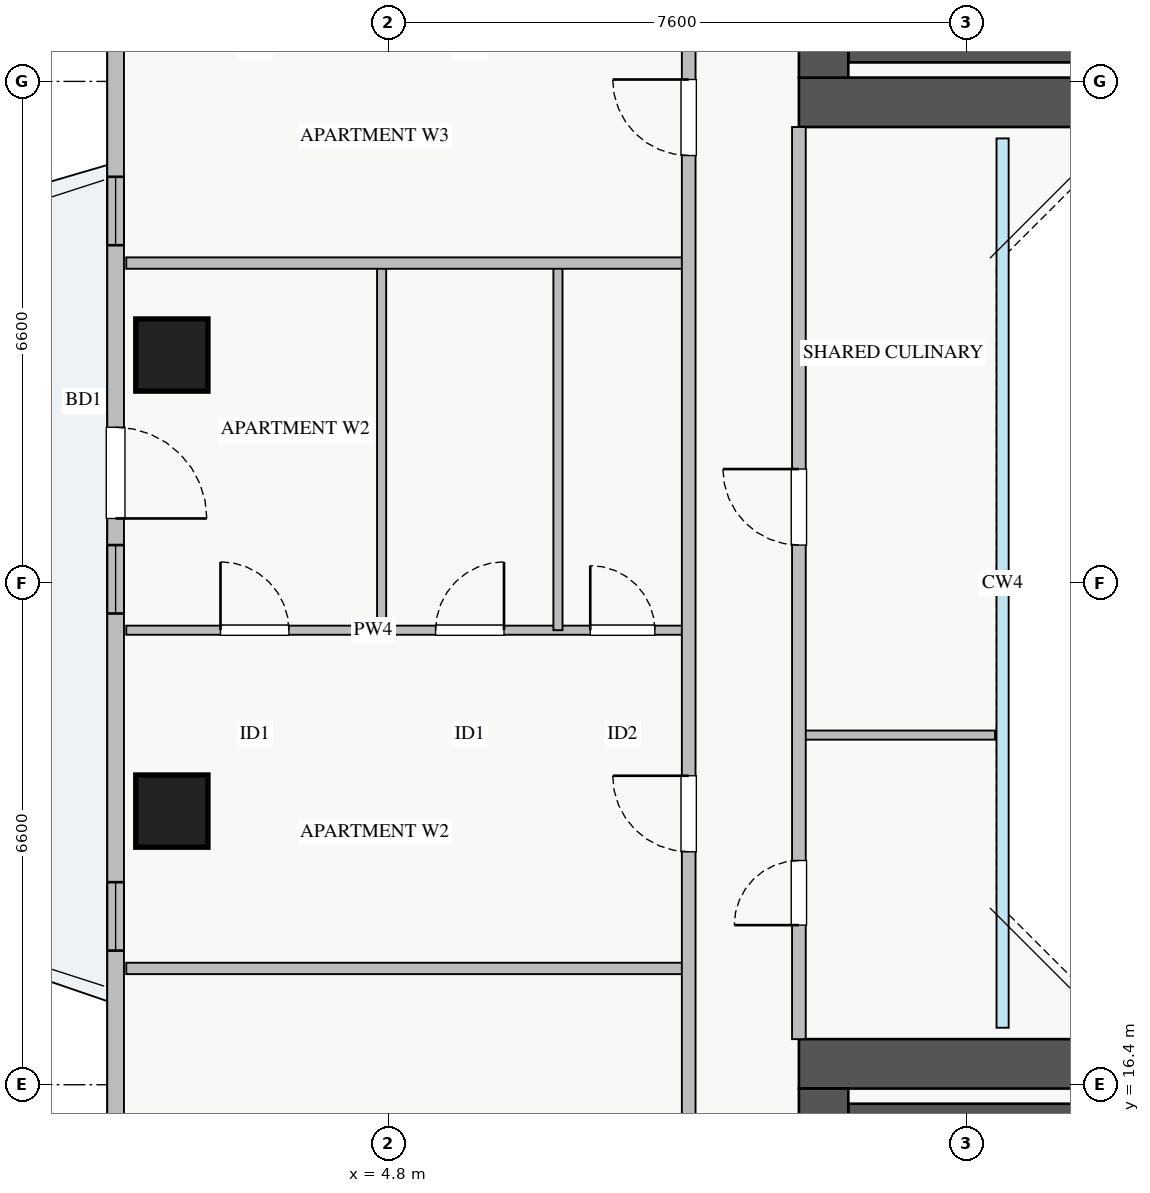
"""IFC4 building model, lengths in metres.
Left out: names, types, materials, properties, quantities, classifications, styles, units other than length and angle.
Written with IfcOpenShell. Run it as: python <this file> out.ifc"""

import sys

from ifc_helpers import new_model, si_unit, direction, frame, frame_2d, origin, origin_2d, place, context, subcontext, project, spatial, rectangle, extrude, source, transform, mapped, element, fill, save


model = new_model("IFC4")
c1 = context("Model", 3, precision=1e-05, world=origin(), true_north=direction((0.0, 1.0)))
c2 = subcontext(c1, "Body", "Model", "MODEL_VIEW")
j1 = project(units=[si_unit("LENGTHUNIT", "METRE"), si_unit("PLANEANGLEUNIT", "RADIAN")], contexts=[c1])
p1 = place(None, origin())
s1 = spatial("IfcSite", under=j1, at=p1, CompositionType="ELEMENT")
p2 = place(p1, origin())
s2 = spatial("IfcBuilding", under=s1, at=p2, CompositionType="ELEMENT")
p3 = place(p2, frame((0.0, 0.0, 147.0)))
s3 = spatial("IfcBuildingStorey", under=s2, at=p3, CompositionType="ELEMENT", Elevation=147.0)
for number, where, z_axis, x_axis in (
    (1, (10.85, 29.95, 0.0), (0.0, 0.0, 1.0), (1.0, 0.0, 0.0)),
    (2, (10.85, 16.05, 0.0), (0.0, 0.0, 1.0), (1.0, 0.0, 0.0)),
):
    element("IfcWall", number, at=place(p3, frame(where, z_axis=z_axis, x_axis=x_axis)), inside=s3, PredefinedType="SHEAR", context=c2, shape_type="SweptSolid", body=[
        extrude(rectangle(XDim=7.3, YDim=0.2, at=frame_2d((3.65, 0.0))), origin(), (0.0, 0.0, 1.0), 3.25),
    ])
p4 = place(p3, frame((10.2, 29.325, 0.0), z_axis=(0.0, 0.0, 1.0), x_axis=(1.0, 0.0, 0.0)))
e3 = element("IfcWall", 3, at=p4, inside=s3, PredefinedType="SHEAR", context=c2, shape_type="SweptSolid", body=[
    extrude(rectangle(XDim=17.6, YDim=0.65, at=frame_2d((8.8, 0.0))), origin(), (0.0, 0.0, 1.0), 3.25),
])
p5 = place(p3, frame((10.525, 29.65, 0.0), z_axis=(0.0, 0.0, 1.0), x_axis=(0.0, 1.0, 0.0)))
e4 = element("IfcWall", 4, at=p5, inside=s3, PredefinedType="SHEAR", context=c2, shape_type="SweptSolid", body=[
    extrude(rectangle(XDim=5.9, YDim=0.65, at=frame_2d((2.95, 0.0))), origin(), (0.0, 0.0, 1.0), 3.25),
])
p6 = place(p3, frame((10.2, 16.675, 0.0), z_axis=(0.0, 0.0, 1.0), x_axis=(1.0, 0.0, 0.0)))
e5 = element("IfcWall", 5, at=p6, inside=s3, PredefinedType="SHEAR", context=c2, shape_type="SweptSolid", body=[
    extrude(rectangle(XDim=17.6, YDim=0.65, at=frame_2d((8.8, 0.0))), origin(), (0.0, 0.0, 1.0), 3.25),
])
p7 = place(p3, frame((10.525, 10.45, 0.0), z_axis=(0.0, 0.0, 1.0), x_axis=(0.0, 1.0, 0.0)))
e6 = element("IfcWall", 6, at=p7, inside=s3, PredefinedType="SHEAR", context=c2, shape_type="SweptSolid", body=[
    extrude(rectangle(XDim=5.9, YDim=0.65, at=frame_2d((2.95, 0.0))), origin(), (0.0, 0.0, 1.0), 3.25),
])
m1 = source(origin(), c2, "Body", "SweptSolid", [
    extrude(rectangle(XDim=0.95, YDim=0.95, at=origin_2d()), origin(), (0.0, 0.0, 1.0), 3.25),
])
for number, where, z_axis, x_axis in (
    (7, (1.95, 26.0, 0.0), (0.0, 0.0, 1.0), (1.0, 0.0, 0.0)),
    (8, (1.95, 20.0, 0.0), (0.0, 0.0, 1.0), (1.0, 0.0, 0.0)),
):
    element("IfcColumn", number, at=place(p3, frame(where, z_axis=z_axis, x_axis=x_axis)), inside=s3, PredefinedType="COLUMN", context=c2, shape_type="MappedRepresentation", body=[
        mapped(m1, transform((0.0, 0.0, 0.0), x_axis=(1.0, 0.0, 0.0), y_axis=(0.0, 1.0, 0.0), z_axis=(0.0, 0.0, 1.0), scale=1.0)),
    ])
p8 = place(p3, frame((1.21, 10.55, 0.0), z_axis=(0.0, 0.0, 1.0), x_axis=(0.0, 1.0, 0.0)))
e9 = element("IfcWall", 9, at=p8, inside=s3, PredefinedType="STANDARD", context=c2, shape_type="SweptSolid", body=[
    extrude(rectangle(XDim=24.9, YDim=0.22, at=frame_2d((12.45, 0.0))), origin(), (0.0, 0.0, 1.0), 2.61),
])
p9 = place(p8, frame((13.3, 0.0, 0.0)))
e10 = element("IfcOpeningElement", 10, at=p9, cuts=e9, PredefinedType="OPENING", context=c2, shape_type="SweptSolid", body=[
    extrude(rectangle(XDim=1.2, YDim=2.1, at=frame_2d((0.6, 1.05))), frame((0.0, 0.12, 0.0), z_axis=(0.0, -1.0, 0.0), x_axis=(1.0, 0.0, 0.0)), (0.0, 0.0, 1.0), 0.24),
])
p10 = place(p8, frame((1.912, 0.0, 0.9)))
e11 = element("IfcOpeningElement", 11, at=p10, cuts=e9, PredefinedType="OPENING", context=c2, shape_type="SweptSolid", body=[
    extrude(rectangle(XDim=2.4, YDim=1.48, at=frame_2d((1.2, 0.74))), frame((0.0, 0.12, 0.0), z_axis=(0.0, -1.0, 0.0), x_axis=(1.0, 0.0, 0.0)), (0.0, 0.0, 1.0), 0.24),
])
p11 = place(p8, frame((21.82, 0.0, 0.9)))
e12 = element("IfcOpeningElement", 12, at=p11, cuts=e9, PredefinedType="OPENING", context=c2, shape_type="SweptSolid", body=[
    extrude(rectangle(XDim=2.1, YDim=1.5, at=frame_2d((1.05, 0.75))), frame((0.0, 0.12, 0.0), z_axis=(0.0, -1.0, 0.0), x_axis=(1.0, 0.0, 0.0)), (0.0, 0.0, 1.0), 0.24),
])
p12 = place(p8, frame((12.05, 0.0, 0.9)))
e13 = element("IfcOpeningElement", 13, at=p12, cuts=e9, PredefinedType="OPENING", context=c2, shape_type="SweptSolid", body=[
    extrude(rectangle(XDim=0.9, YDim=1.2, at=frame_2d((0.45, 0.6))), frame((0.0, 0.12, 0.0), z_axis=(0.0, -1.0, 0.0), x_axis=(1.0, 0.0, 0.0)), (0.0, 0.0, 1.0), 0.24),
])
p13 = place(p8, frame((7.615, 0.0, 0.9)))
e14 = element("IfcOpeningElement", 14, at=p13, cuts=e9, PredefinedType="OPENING", context=c2, shape_type="SweptSolid", body=[
    extrude(rectangle(XDim=0.9, YDim=1.2, at=frame_2d((0.45, 0.6))), frame((0.0, 0.12, 0.0), z_axis=(0.0, -1.0, 0.0), x_axis=(1.0, 0.0, 0.0)), (0.0, 0.0, 1.0), 0.24),
])
p14 = place(p8, frame((16.895, 0.0, 0.9)))
e15 = element("IfcOpeningElement", 15, at=p14, cuts=e9, PredefinedType="OPENING", context=c2, shape_type="SweptSolid", body=[
    extrude(rectangle(XDim=0.9, YDim=1.2, at=frame_2d((0.45, 0.6))), frame((0.0, 0.12, 0.0), z_axis=(0.0, -1.0, 0.0), x_axis=(1.0, 0.0, 0.0)), (0.0, 0.0, 1.0), 0.24),
])
p15 = place(p3, frame((1.35, 22.38, 0.0), z_axis=(0.0, 0.0, 1.0), x_axis=(1.0, 0.0, 0.0)))
e16 = element("IfcWall", 16, at=p15, inside=s3, PredefinedType="PLUMBINGWALL", context=c2, shape_type="SweptSolid", body=[
    extrude(rectangle(XDim=7.4, YDim=0.12, at=frame_2d((3.7, 0.0))), origin(), (0.0, 0.0, 1.0), 3.07),
])
p16 = place(p15, frame((1.24, 0.0, 0.0)))
e17 = element("IfcOpeningElement", 17, at=p16, cuts=e16, PredefinedType="OPENING", context=c2, shape_type="SweptSolid", body=[
    extrude(rectangle(XDim=0.9, YDim=2.05, at=frame_2d((0.45, 1.025))), frame((0.0, 0.07, 0.0), z_axis=(0.0, -1.0, 0.0), x_axis=(1.0, 0.0, 0.0)), (0.0, 0.0, 1.0), 0.14),
])
p17 = place(p15, frame((4.07, 0.0, 0.0)))
e18 = element("IfcOpeningElement", 18, at=p17, cuts=e16, PredefinedType="OPENING", context=c2, shape_type="SweptSolid", body=[
    extrude(rectangle(XDim=0.9, YDim=2.05, at=frame_2d((0.45, 1.025))), frame((0.0, 0.07, 0.0), z_axis=(0.0, -1.0, 0.0), x_axis=(1.0, 0.0, 0.0)), (0.0, 0.0, 1.0), 0.14),
])
p18 = place(p15, frame((6.105, 0.0, 0.0)))
e19 = element("IfcOpeningElement", 19, at=p18, cuts=e16, PredefinedType="OPENING", context=c2, shape_type="SweptSolid", body=[
    extrude(rectangle(XDim=0.85, YDim=2.05, at=frame_2d((0.425, 1.025))), frame((0.0, 0.07, 0.0), z_axis=(0.0, -1.0, 0.0), x_axis=(1.0, 0.0, 0.0)), (0.0, 0.0, 1.0), 0.14),
])
for number, where, z_axis, x_axis in (
    (20, (4.71, 22.38, 0.0), (0.0, 0.0, 1.0), (0.0, 1.0, 0.0)),
    (21, (7.03, 22.38, 0.0), (0.0, 0.0, 1.0), (0.0, 1.0, 0.0)),
):
    element("IfcWall", number, at=place(p3, frame(where, z_axis=z_axis, x_axis=x_axis)), inside=s3, PredefinedType="PLUMBINGWALL", context=c2, shape_type="SweptSolid", body=[
        extrude(rectangle(XDim=4.83, YDim=0.12, at=frame_2d((2.415, 0.0))), origin(), (0.0, 0.0, 1.0), 3.07),
    ])
for number, where, z_axis, x_axis in (
    (22, (1.35, 17.93, 0.0), (0.0, 0.0, 1.0), (1.0, 0.0, 0.0)),
    (23, (1.35, 27.21, 0.0), (0.0, 0.0, 1.0), (1.0, 0.0, 0.0)),
):
    element("IfcWall", number, at=place(p3, frame(where, z_axis=z_axis, x_axis=x_axis)), inside=s3, PredefinedType="PARTITIONING", context=c2, shape_type="SweptSolid", body=[
        extrude(rectangle(XDim=7.4, YDim=0.15, at=frame_2d((3.7, 0.0))), origin(), (0.0, 0.0, 1.0), 3.07),
    ])
p19 = place(p3, frame((8.75, 8.3, 0.0), z_axis=(0.0, 0.0, 1.0), x_axis=(0.0, 1.0, 0.0)))
e24 = element("IfcWall", 24, at=p19, inside=s3, PredefinedType="PARTITIONING", context=c2, shape_type="SweptSolid", body=[
    extrude(rectangle(XDim=29.4, YDim=0.18, at=frame_2d((14.7, 0.0))), origin(), (0.0, 0.0, 1.0), 3.07),
])
p20 = place(p19, frame((28.08, 0.0, 0.0)))
e25 = element("IfcOpeningElement", 25, at=p20, cuts=e24, PredefinedType="OPENING", context=c2, shape_type="SweptSolid", body=[
    extrude(rectangle(XDim=0.9, YDim=2.05, at=frame_2d((0.45, 1.025))), frame((0.0, 0.1, 0.0), z_axis=(0.0, -1.0, 0.0), x_axis=(1.0, 0.0, 0.0)), (0.0, 0.0, 1.0), 0.2),
])
p21 = place(p19, frame((0.245, 0.0, 0.0)))
e26 = element("IfcOpeningElement", 26, at=p21, cuts=e24, PredefinedType="OPENING", context=c2, shape_type="SweptSolid", body=[
    extrude(rectangle(XDim=0.9, YDim=2.05, at=frame_2d((0.45, 1.025))), frame((0.0, 0.1, 0.0), z_axis=(0.0, -1.0, 0.0), x_axis=(1.0, 0.0, 0.0)), (0.0, 0.0, 1.0), 0.2),
])
p22 = place(p19, frame((5.0, 0.0, 0.0)))
e27 = element("IfcOpeningElement", 27, at=p22, cuts=e24, PredefinedType="OPENING", context=c2, shape_type="SweptSolid", body=[
    extrude(rectangle(XDim=1.0, YDim=2.05, at=frame_2d((0.5, 1.025))), frame((0.0, 0.1, 0.0), z_axis=(0.0, -1.0, 0.0), x_axis=(1.0, 0.0, 0.0)), (0.0, 0.0, 1.0), 0.2),
])
p23 = place(p19, frame((11.165, 0.0, 0.0)))
e28 = element("IfcOpeningElement", 28, at=p23, cuts=e24, PredefinedType="OPENING", context=c2, shape_type="SweptSolid", body=[
    extrude(rectangle(XDim=1.0, YDim=2.05, at=frame_2d((0.5, 1.025))), frame((0.0, 0.1, 0.0), z_axis=(0.0, -1.0, 0.0), x_axis=(1.0, 0.0, 0.0)), (0.0, 0.0, 1.0), 0.2),
])
p24 = place(p19, frame((20.325, 0.0, 0.0)))
e29 = element("IfcOpeningElement", 29, at=p24, cuts=e24, PredefinedType="OPENING", context=c2, shape_type="SweptSolid", body=[
    extrude(rectangle(XDim=1.0, YDim=2.05, at=frame_2d((0.5, 1.025))), frame((0.0, 0.1, 0.0), z_axis=(0.0, -1.0, 0.0), x_axis=(1.0, 0.0, 0.0)), (0.0, 0.0, 1.0), 0.2),
])
p25 = place(p3, frame((10.2, 21.0, 0.0), z_axis=(0.0, 0.0, 1.0), x_axis=(1.0, 0.0, 0.0)))
e30 = element("IfcWall", 30, at=p25, inside=s3, PredefinedType="PLUMBINGWALL", context=c2, shape_type="SweptSolid", body=[
    extrude(rectangle(XDim=2.58, YDim=0.12, at=frame_2d((1.29, 0.0))), origin(), (0.0, 0.0, 1.0), 3.07),
])
p26 = place(p3, frame((10.2, 17.0, 0.0), z_axis=(0.0, 0.0, 1.0), x_axis=(0.0, 1.0, 0.0)))
e31 = element("IfcWall", 31, at=p26, inside=s3, PredefinedType="PARTITIONING", context=c2, shape_type="SweptSolid", body=[
    extrude(rectangle(XDim=12.0, YDim=0.18, at=frame_2d((6.0, 0.0))), origin(), (0.0, 0.0, 1.0), 3.07),
])
p27 = place(p26, frame((1.5, 0.0, 0.0)))
e32 = element("IfcOpeningElement", 32, at=p27, cuts=e31, PredefinedType="OPENING", context=c2, shape_type="SweptSolid", body=[
    extrude(rectangle(XDim=0.85, YDim=2.05, at=frame_2d((0.425, 1.025))), frame((0.0, 0.1, 0.0), z_axis=(0.0, -1.0, 0.0), x_axis=(1.0, 0.0, 0.0)), (0.0, 0.0, 1.0), 0.2),
])
p28 = place(p26, frame((6.5, 0.0, 0.0)))
e33 = element("IfcOpeningElement", 33, at=p28, cuts=e31, PredefinedType="OPENING", context=c2, shape_type="SweptSolid", body=[
    extrude(rectangle(XDim=1.0, YDim=2.05, at=frame_2d((0.5, 1.025))), frame((0.0, 0.1, 0.0), z_axis=(0.0, -1.0, 0.0), x_axis=(1.0, 0.0, 0.0)), (0.0, 0.0, 1.0), 0.2),
])
m2 = source(origin(), c2, "Body", "SweptSolid", [
    extrude(rectangle(XDim=1.2, YDim=2.1, at=frame_2d((0.6, 1.05))), frame((0.0, 0.025, 0.0), z_axis=(0.0, -1.0, 0.0), x_axis=(1.0, 0.0, 0.0)), (0.0, 0.0, 1.0), 0.05),
])
p29 = place(p9, frame((1.2, 0.0, 0.0), z_axis=(0.0, 0.0, 1.0), x_axis=(-1.0, 0.0, 0.0)))
e34 = element("IfcDoor", 34, at=p29, inside=s3, OperationType="SINGLE_SWING_LEFT", PredefinedType="DOOR", context=c2, shape_type="MappedRepresentation", body=[
    mapped(m2, transform((0.0, 0.0, 0.0), x_axis=(1.0, 0.0, 0.0), y_axis=(0.0, 1.0, 0.0), z_axis=(0.0, 0.0, 1.0), scale=1.0)),
])
fill(e10, e34)
m3 = source(origin(), c2, "Body", "SweptSolid", [
    extrude(rectangle(XDim=0.9, YDim=2.05, at=frame_2d((0.45, 1.025))), frame((0.0, 0.025, 0.0), z_axis=(0.0, -1.0, 0.0), x_axis=(1.0, 0.0, 0.0)), (0.0, 0.0, 1.0), 0.05),
])
p30 = place(p16, origin())
e35 = element("IfcDoor", 35, at=p30, inside=s3, OperationType="SINGLE_SWING_LEFT", PredefinedType="DOOR", context=c2, shape_type="MappedRepresentation", body=[
    mapped(m3, transform((0.0, 0.0, 0.0), x_axis=(1.0, 0.0, 0.0), y_axis=(0.0, 1.0, 0.0), z_axis=(0.0, 0.0, 1.0), scale=1.0)),
])
fill(e17, e35)
p31 = place(p17, origin())
e36 = element("IfcDoor", 36, at=p31, inside=s3, OperationType="SINGLE_SWING_RIGHT", PredefinedType="DOOR", context=c2, shape_type="MappedRepresentation", body=[
    mapped(m3, transform((0.0, 0.0, 0.0), x_axis=(1.0, 0.0, 0.0), y_axis=(0.0, 1.0, 0.0), z_axis=(0.0, 0.0, 1.0), scale=1.0)),
])
fill(e18, e36)
m4 = source(origin(), c2, "Body", "SweptSolid", [
    extrude(rectangle(XDim=0.85, YDim=2.05, at=frame_2d((0.425, 1.025))), frame((0.0, 0.025, 0.0), z_axis=(0.0, -1.0, 0.0), x_axis=(1.0, 0.0, 0.0)), (0.0, 0.0, 1.0), 0.05),
])
p32 = place(p18, origin())
e37 = element("IfcDoor", 37, at=p32, inside=s3, OperationType="SINGLE_SWING_LEFT", PredefinedType="DOOR", context=c2, shape_type="MappedRepresentation", body=[
    mapped(m4, transform((0.0, 0.0, 0.0), x_axis=(1.0, 0.0, 0.0), y_axis=(0.0, 1.0, 0.0), z_axis=(0.0, 0.0, 1.0), scale=1.0)),
])
fill(e19, e37)
m5 = source(origin(), c2, "Body", "SweptSolid", [
    extrude(rectangle(XDim=1.0, YDim=2.05, at=frame_2d((0.5, 1.025))), frame((0.0, 0.025, 0.0), z_axis=(0.0, -1.0, 0.0), x_axis=(1.0, 0.0, 0.0)), (0.0, 0.0, 1.0), 0.05),
])
p33 = place(p23, origin())
e38 = element("IfcDoor", 38, at=p33, inside=s3, OperationType="SINGLE_SWING_RIGHT", PredefinedType="DOOR", context=c2, shape_type="MappedRepresentation", body=[
    mapped(m5, transform((0.0, 0.0, 0.0), x_axis=(1.0, 0.0, 0.0), y_axis=(0.0, 1.0, 0.0), z_axis=(0.0, 0.0, 1.0), scale=1.0)),
])
fill(e28, e38)
p34 = place(p24, origin())
e39 = element("IfcDoor", 39, at=p34, inside=s3, OperationType="SINGLE_SWING_RIGHT", PredefinedType="DOOR", context=c2, shape_type="MappedRepresentation", body=[
    mapped(m5, transform((0.0, 0.0, 0.0), x_axis=(1.0, 0.0, 0.0), y_axis=(0.0, 1.0, 0.0), z_axis=(0.0, 0.0, 1.0), scale=1.0)),
])
fill(e29, e39)
p35 = place(p27, origin())
e40 = element("IfcDoor", 40, at=p35, inside=s3, OperationType="SINGLE_SWING_LEFT", PredefinedType="DOOR", context=c2, shape_type="MappedRepresentation", body=[
    mapped(m4, transform((0.0, 0.0, 0.0), x_axis=(1.0, 0.0, 0.0), y_axis=(0.0, 1.0, 0.0), z_axis=(0.0, 0.0, 1.0), scale=1.0)),
])
fill(e32, e40)
p36 = place(p28, origin())
e41 = element("IfcDoor", 41, at=p36, inside=s3, OperationType="SINGLE_SWING_RIGHT", PredefinedType="DOOR", context=c2, shape_type="MappedRepresentation", body=[
    mapped(m5, transform((0.0, 0.0, 0.0), x_axis=(1.0, 0.0, 0.0), y_axis=(0.0, 1.0, 0.0), z_axis=(0.0, 0.0, 1.0), scale=1.0)),
])
fill(e33, e41)
m6 = source(origin(), c2, "Body", "SweptSolid", [
    extrude(rectangle(XDim=0.9, YDim=1.2, at=frame_2d((0.45, 0.6))), frame((0.0, 0.03, 0.0), z_axis=(0.0, -1.0, 0.0), x_axis=(1.0, 0.0, 0.0)), (0.0, 0.0, 1.0), 0.06),
])
p37 = place(p12, origin())
e42 = element("IfcWindow", 42, at=p37, inside=s3, PartitioningType="SINGLE_PANEL", PredefinedType="WINDOW", context=c2, shape_type="MappedRepresentation", body=[
    mapped(m6, transform((0.0, 0.0, 0.0), x_axis=(1.0, 0.0, 0.0), y_axis=(0.0, 1.0, 0.0), z_axis=(0.0, 0.0, 1.0), scale=1.0)),
])
fill(e13, e42)
p38 = place(p13, origin())
e43 = element("IfcWindow", 43, at=p38, inside=s3, PartitioningType="SINGLE_PANEL", PredefinedType="WINDOW", context=c2, shape_type="MappedRepresentation", body=[
    mapped(m6, transform((0.0, 0.0, 0.0), x_axis=(1.0, 0.0, 0.0), y_axis=(0.0, 1.0, 0.0), z_axis=(0.0, 0.0, 1.0), scale=1.0)),
])
fill(e14, e43)
p39 = place(p14, origin())
e44 = element("IfcWindow", 44, at=p39, inside=s3, PartitioningType="SINGLE_PANEL", PredefinedType="WINDOW", context=c2, shape_type="MappedRepresentation", body=[
    mapped(m6, transform((0.0, 0.0, 0.0), x_axis=(1.0, 0.0, 0.0), y_axis=(0.0, 1.0, 0.0), z_axis=(0.0, 0.0, 1.0), scale=1.0)),
])
fill(e15, e44)
save(model, sys.argv[1])
